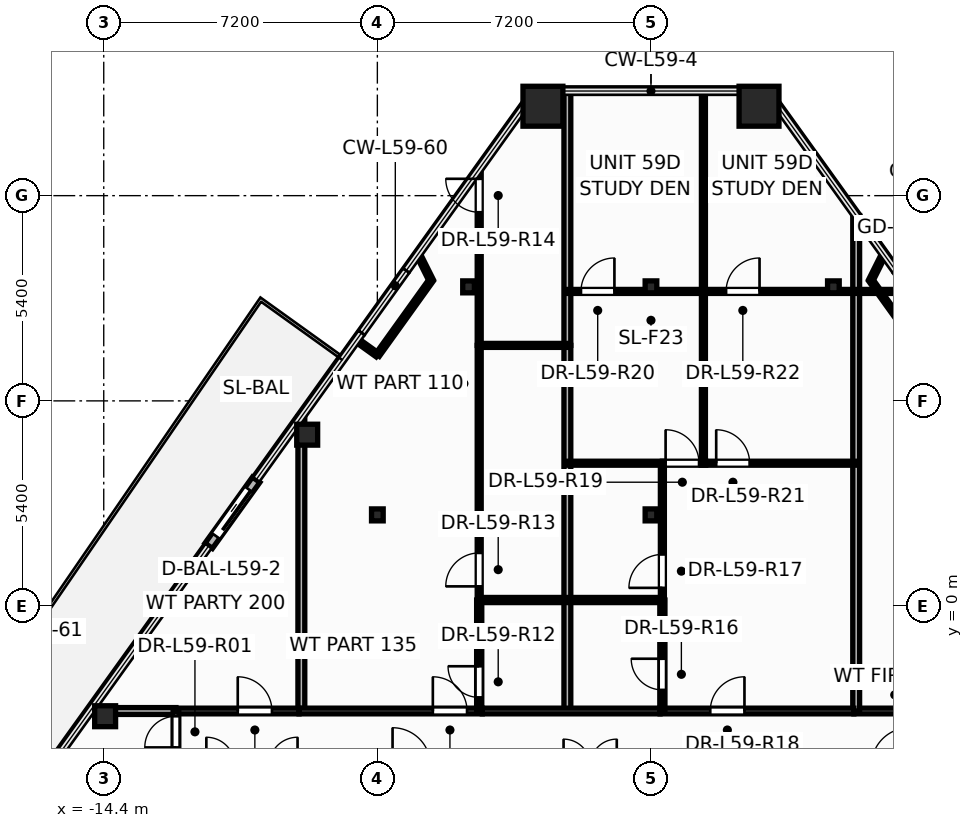
"""IFC4 building model, lengths in metres.
Left out: names, types, materials, properties, quantities, classifications, styles, units other than length and angle.
Written with IfcOpenShell. Run it as: python <this file> out.ifc"""

import sys

from ifc_helpers import new_model, si_unit, direction, frame, frame_2d, origin, origin_2d, place, context, subcontext, project, spatial, rectangle, hollow_rectangle, hollow_circle, i_section, extrude, element, fill, save


model = new_model("IFC4")
c1 = context("Model", 3, precision=1e-05, world=origin(), true_north=direction((0.0, 1.0)))
c2 = subcontext(c1, "Body", "Model", "MODEL_VIEW")
j1 = project(units=[si_unit("LENGTHUNIT", "METRE"), si_unit("PLANEANGLEUNIT", "RADIAN")], contexts=[c1])
p1 = place(None, origin())
s1 = spatial("IfcSite", under=j1, at=p1, CompositionType="ELEMENT")
p2 = place(p1, origin())
s2 = spatial("IfcBuilding", under=s1, at=p2, CompositionType="ELEMENT")
p3 = place(p2, frame((0.0, 0.0, 225.3)))
s3 = spatial("IfcBuildingStorey", under=s2, at=p3, CompositionType="ELEMENT", Elevation=225.3)
for number, where, z_axis, x_axis in (
    (1, (2.843, 13.153, 0.0), (0.0, 0.0, 1.0), (1.0, 0.0, 0.0)),
    (2, (-2.843, 13.153, 0.0), (0.0, 0.0, 1.0), (1.0, 0.0, 0.0)),
):
    element("IfcColumn", number, at=place(p3, frame(where, z_axis=z_axis, x_axis=x_axis)), inside=s3, PredefinedType="COLUMN", context=c2, shape_type="SweptSolid", body=[
        extrude(hollow_rectangle(XDim=1.05, YDim=1.05, WallThickness=0.045, at=origin_2d()), origin(), (0.0, 0.0, 1.0), 3.6),
    ])
for number, where, z_axis, x_axis in (
    (3, (-9.046, 4.51, 0.0), (0.0, 0.0, 1.0), (1.0, 0.0, 0.0)),
    (4, (-14.363, -2.897, 0.0), (0.0, 0.0, 1.0), (1.0, 0.0, 0.0)),
):
    element("IfcColumn", number, at=place(p3, frame(where, z_axis=z_axis, x_axis=x_axis)), inside=s3, PredefinedType="COLUMN", context=c2, shape_type="SweptSolid", body=[
        extrude(hollow_circle(Radius=0.275, WallThickness=0.024, at=origin_2d()), origin(), (0.0, 0.0, 1.0), 3.6),
    ])
for number, where, z_axis, x_axis in (
    (5, (-7.2, 2.4, 0.0), (0.0, 0.0, 1.0), (1.0, 0.0, 0.0)),
    (6, (0.0, 2.4, 0.0), (0.0, 0.0, 1.0), (1.0, 0.0, 0.0)),
    (7, (-4.8, 8.4, 0.0), (0.0, 0.0, 1.0), (1.0, 0.0, 0.0)),
    (8, (0.0, 8.4, 0.0), (0.0, 0.0, 1.0), (1.0, 0.0, 0.0)),
    (9, (4.8, 8.4, 0.0), (0.0, 0.0, 1.0), (1.0, 0.0, 0.0)),
):
    element("IfcColumn", number, at=place(p3, frame(where, z_axis=z_axis, x_axis=x_axis)), inside=s3, PredefinedType="COLUMN", context=c2, shape_type="SweptSolid", body=[
        extrude(i_section(OverallWidth=0.307, OverallDepth=0.314, WebThickness=0.012, FlangeThickness=0.019, at=origin_2d()), origin(), (0.0, 0.0, 1.0), 3.6),
    ])
p4 = place(p3, frame((-10.39, 3.325, -0.015), z_axis=(0.0, 0.0, 1.0), x_axis=(-0.583092889468, -0.812405491274, 0.0)))
e10 = element("IfcWall", 10, at=p4, inside=s3, PredefinedType="STANDARD", context=c2, shape_type="SweptSolid", body=[
    extrude(rectangle(XDim=2.14, YDim=0.24, at=frame_2d((1.07, 0.0))), origin(), (0.0, 0.0, 1.0), 2.853),
])
p5 = place(p4, frame((0.32, 0.0, 0.015)))
e11 = element("IfcOpeningElement", 11, at=p5, cuts=e10, PredefinedType="OPENING", context=c2, shape_type="SweptSolid", body=[
    extrude(rectangle(XDim=1.506, YDim=2.204, at=frame_2d((0.75, 1.102))), frame((0.0, 0.13, 0.0), z_axis=(0.0, -1.0, 0.0), x_axis=(1.0, 0.0, 0.0)), (0.0, 0.0, 1.0), 0.26),
])
p6 = place(p3, frame((-9.2, -2.76, 0.0), z_axis=(0.0, 0.0, 1.0), x_axis=(0.0, 1.0, 0.0)))
e12 = element("IfcWall", 12, at=p6, inside=s3, PredefinedType="PARTITIONING", context=c2, shape_type="SweptSolid", body=[
    extrude(rectangle(XDim=7.742, YDim=0.18, at=frame_2d((3.871, 0.0))), origin(), (0.0, 0.0, 1.0), 2.595),
])
p7 = place(p3, frame((5.34, -2.76, 0.0), z_axis=(0.0, 0.0, 1.0), x_axis=(1.0, 0.0, 0.0)))
e13 = element("IfcWall", 13, at=p7, inside=s3, PredefinedType="PARTITIONING", context=c2, shape_type="SweptSolid", body=[
    extrude(rectangle(XDim=7.16, YDim=0.15, at=frame_2d((3.58, 0.0))), origin(), (0.0, 0.0, 1.0), 2.295),
])
p8 = place(p7, frame((3.429, 0.0, 0.0)))
e14 = element("IfcOpeningElement", 14, at=p8, cuts=e13, PredefinedType="OPENING", context=c2, shape_type="SweptSolid", body=[
    extrude(rectangle(XDim=0.906, YDim=2.104, at=frame_2d((0.45, 1.052))), frame((0.0, 0.085, 0.0), z_axis=(0.0, -1.0, 0.0), x_axis=(1.0, 0.0, 0.0)), (0.0, 0.0, 1.0), 0.17),
])
p9 = place(p3, frame((-4.52, 0.16, 0.0), z_axis=(0.0, 0.0, 1.0), x_axis=(0.0, 1.0, 0.0)))
e15 = element("IfcWall", 15, at=p9, inside=s3, PredefinedType="PARTITIONING", context=c2, shape_type="SweptSolid", body=[
    extrude(rectangle(XDim=6.7, YDim=0.105, at=frame_2d((3.35, 0.0))), origin(), (0.0, 0.0, 1.0), 2.295),
])
p10 = place(p9, frame((0.359, 0.0, 0.0)))
e16 = element("IfcOpeningElement", 16, at=p10, cuts=e15, PredefinedType="OPENING", context=c2, shape_type="SweptSolid", body=[
    extrude(rectangle(XDim=0.886, YDim=2.104, at=frame_2d((0.44, 1.052))), frame((0.0, 0.062, 0.0), z_axis=(0.0, -1.0, 0.0), x_axis=(1.0, 0.0, 0.0)), (0.0, 0.0, 1.0), 0.125),
])
p11 = place(p3, frame((5.4, -2.76, 0.0), z_axis=(0.0, 0.0, 1.0), x_axis=(0.0, 1.0, 0.0)))
e17 = element("IfcWall", 17, at=p11, inside=s3, PredefinedType="PARTITIONING", context=c2, shape_type="SweptSolid", body=[
    extrude(rectangle(XDim=13.037, YDim=0.18, at=frame_2d((6.518, 0.0))), origin(), (0.0, 0.0, 1.0), 2.295),
])
p12 = place(p3, frame((1.38, 8.28, 0.0), z_axis=(0.0, 0.0, 1.0), x_axis=(1.0, 0.0, 0.0)))
e18 = element("IfcWall", 18, at=p12, inside=s3, PredefinedType="PARTITIONING", context=c2, shape_type="SweptSolid", body=[
    extrude(rectangle(XDim=5.453, YDim=0.105, at=frame_2d((2.727, 0.0))), origin(), (0.0, 0.0, 1.0), 2.595),
])
p13 = place(p12, frame((0.597, 0.0, 0.0)))
e19 = element("IfcOpeningElement", 19, at=p13, cuts=e18, PredefinedType="OPENING", context=c2, shape_type="SweptSolid", body=[
    extrude(rectangle(XDim=0.886, YDim=2.104, at=frame_2d((0.44, 1.052))), frame((0.0, 0.062, 0.0), z_axis=(0.0, -1.0, 0.0), x_axis=(1.0, 0.0, 0.0)), (0.0, 0.0, 1.0), 0.125),
])
p14 = place(p3, frame((-2.2, 6.86, 0.0), z_axis=(0.0, 0.0, 1.0), x_axis=(0.0, 1.0, 0.0)))
e20 = element("IfcWall", 20, at=p14, inside=s3, PredefinedType="PARTITIONING", context=c2, shape_type="SweptSolid", body=[
    extrude(rectangle(XDim=6.693, YDim=0.18, at=frame_2d((3.346, 0.0))), origin(), (0.0, 0.0, 1.0), 2.595),
])
p15 = place(p3, frame((1.38, 3.76, 0.0), z_axis=(0.0, 0.0, 1.0), x_axis=(0.0, 1.0, 0.0)))
e21 = element("IfcWall", 21, at=p15, inside=s3, PredefinedType="PARTITIONING", context=c2, shape_type="SweptSolid", body=[
    extrude(rectangle(XDim=9.793, YDim=0.105, at=frame_2d((4.896, 0.0))), origin(), (0.0, 0.0, 1.0), 2.595),
])
p16 = place(p3, frame((0.24, -2.76, 0.0), z_axis=(0.0, 0.0, 1.0), x_axis=(1.0, 0.0, 0.0)))
e22 = element("IfcWall", 22, at=p16, inside=s3, PredefinedType="PARTITIONING", context=c2, shape_type="SweptSolid", body=[
    extrude(rectangle(XDim=5.098, YDim=0.15, at=frame_2d((2.549, 0.0))), origin(), (0.0, 0.0, 1.0), 2.939),
])
p17 = place(p16, frame((1.32, 0.0, 0.0)))
e23 = element("IfcOpeningElement", 23, at=p17, cuts=e22, PredefinedType="OPENING", context=c2, shape_type="SweptSolid", body=[
    extrude(rectangle(XDim=0.906, YDim=2.104, at=frame_2d((0.45, 1.052))), frame((0.0, 0.085, 0.0), z_axis=(0.0, -1.0, 0.0), x_axis=(1.0, 0.0, 0.0)), (0.0, 0.0, 1.0), 0.17),
])
p18 = place(p3, frame((-9.26, -2.76, 0.0), z_axis=(0.0, 0.0, 1.0), x_axis=(1.0, 0.0, 0.0)))
e24 = element("IfcWall", 24, at=p18, inside=s3, PredefinedType="PARTITIONING", context=c2, shape_type="SweptSolid", body=[
    extrude(rectangle(XDim=4.82, YDim=0.15, at=frame_2d((2.41, 0.0))), origin(), (0.0, 0.0, 1.0), 2.295),
])
p19 = place(p18, frame((3.52, 0.0, 0.0)))
e25 = element("IfcOpeningElement", 25, at=p19, cuts=e24, PredefinedType="OPENING", context=c2, shape_type="SweptSolid", body=[
    extrude(rectangle(XDim=0.906, YDim=2.104, at=frame_2d((0.45, 1.052))), frame((0.0, 0.085, 0.0), z_axis=(0.0, -1.0, 0.0), x_axis=(1.0, 0.0, 0.0)), (0.0, 0.0, 1.0), 0.17),
])
p20 = place(p3, frame((-4.52, 6.86, 0.0), z_axis=(0.0, 0.0, 1.0), x_axis=(0.0, 1.0, 0.0)))
e26 = element("IfcWall", 26, at=p20, inside=s3, PredefinedType="PARTITIONING", context=c2, shape_type="SweptSolid", body=[
    extrude(rectangle(XDim=4.643, YDim=0.105, at=frame_2d((2.321, 0.0))), origin(), (0.0, 0.0, 1.0), 2.595),
])
p21 = place(p20, frame((3.503, 0.0, 0.0)))
e27 = element("IfcOpeningElement", 27, at=p21, cuts=e26, PredefinedType="OPENING", context=c2, shape_type="SweptSolid", body=[
    extrude(rectangle(XDim=0.886, YDim=2.104, at=frame_2d((0.44, 1.052))), frame((0.0, 0.062, 0.0), z_axis=(0.0, -1.0, 0.0), x_axis=(1.0, 0.0, 0.0)), (0.0, 0.0, 1.0), 0.125),
])
p22 = place(p3, frame((1.32, 3.76, 0.0), z_axis=(0.0, 0.0, 1.0), x_axis=(1.0, 0.0, 0.0)))
e28 = element("IfcWall", 28, at=p22, inside=s3, PredefinedType="PARTITIONING", context=c2, shape_type="SweptSolid", body=[
    extrude(rectangle(XDim=4.08, YDim=0.105, at=frame_2d((2.04, 0.0))), origin(), (0.0, 0.0, 1.0), 2.939),
])
p23 = place(p22, frame((0.396, 0.0, 0.0)))
e29 = element("IfcOpeningElement", 29, at=p23, cuts=e28, PredefinedType="OPENING", context=c2, shape_type="SweptSolid", body=[
    extrude(rectangle(XDim=0.886, YDim=2.104, at=frame_2d((0.44, 1.052))), frame((0.0, 0.062, 0.0), z_axis=(0.0, -1.0, 0.0), x_axis=(1.0, 0.0, 0.0)), (0.0, 0.0, 1.0), 0.125),
])
p24 = place(p3, frame((-2.2, -2.76, 0.0), z_axis=(0.0, 0.0, 1.0), x_axis=(0.0, 1.0, 0.0)))
e30 = element("IfcWall", 30, at=p24, inside=s3, PredefinedType="PARTITIONING", context=c2, shape_type="SweptSolid", body=[
    extrude(rectangle(XDim=9.62, YDim=0.18, at=frame_2d((4.81, 0.0))), origin(), (0.0, 0.0, 1.0), 2.295),
])
p25 = place(p3, frame((0.3, 0.16, 0.0), z_axis=(0.0, 0.0, 1.0), x_axis=(0.0, 1.0, 0.0)))
e31 = element("IfcWall", 31, at=p25, inside=s3, PredefinedType="PARTITIONING", context=c2, shape_type="SweptSolid", body=[
    extrude(rectangle(XDim=3.6, YDim=0.105, at=frame_2d((1.8, 0.0))), origin(), (0.0, 0.0, 1.0), 2.295),
])
p26 = place(p25, frame((0.32, 0.0, 0.0)))
e32 = element("IfcOpeningElement", 32, at=p26, cuts=e31, PredefinedType="OPENING", context=c2, shape_type="SweptSolid", body=[
    extrude(rectangle(XDim=0.886, YDim=2.104, at=frame_2d((0.44, 1.052))), frame((0.0, 0.062, 0.0), z_axis=(0.0, -1.0, 0.0), x_axis=(1.0, 0.0, 0.0)), (0.0, 0.0, 1.0), 0.125),
])
p27 = place(p3, frame((-2.2, 8.28, 0.0), z_axis=(0.0, 0.0, 1.0), x_axis=(1.0, 0.0, 0.0)))
e33 = element("IfcWall", 33, at=p27, inside=s3, PredefinedType="PARTITIONING", context=c2, shape_type="SweptSolid", body=[
    extrude(rectangle(XDim=3.58, YDim=0.105, at=frame_2d((1.79, 0.0))), origin(), (0.0, 0.0, 1.0), 2.295),
])
p28 = place(p27, frame((0.358, 0.0, 0.0)))
e34 = element("IfcOpeningElement", 34, at=p28, cuts=e33, PredefinedType="OPENING", context=c2, shape_type="SweptSolid", body=[
    extrude(rectangle(XDim=0.886, YDim=2.104, at=frame_2d((0.44, 1.052))), frame((0.0, 0.062, 0.0), z_axis=(0.0, -1.0, 0.0), x_axis=(1.0, 0.0, 0.0)), (0.0, 0.0, 1.0), 0.125),
])
p29 = place(p3, frame((-12.5, -2.76, 0.0), z_axis=(0.0, 0.0, 1.0), x_axis=(1.0, 0.0, 0.0)))
e35 = element("IfcWall", 35, at=p29, inside=s3, PredefinedType="PARTITIONING", context=c2, shape_type="SweptSolid", body=[
    extrude(rectangle(XDim=3.238, YDim=0.15, at=frame_2d((1.619, 0.0))), origin(), (0.0, 0.0, 1.0), 3.32),
])
p30 = place(p29, frame((1.626, 0.0, 0.0)))
e36 = element("IfcOpeningElement", 36, at=p30, cuts=e35, PredefinedType="OPENING", context=c2, shape_type="SweptSolid", body=[
    extrude(rectangle(XDim=0.906, YDim=2.104, at=frame_2d((0.45, 1.052))), frame((0.0, 0.085, 0.0), z_axis=(0.0, -1.0, 0.0), x_axis=(1.0, 0.0, 0.0)), (0.0, 0.0, 1.0), 0.17),
])
p31 = place(p3, frame((-4.52, -2.76, 0.0), z_axis=(0.0, 0.0, 1.0), x_axis=(0.0, 1.0, 0.0)))
e37 = element("IfcWall", 37, at=p31, inside=s3, PredefinedType="PARTITIONING", context=c2, shape_type="SweptSolid", body=[
    extrude(rectangle(XDim=2.92, YDim=0.135, at=frame_2d((1.46, 0.0))), origin(), (0.0, 0.0, 1.0), 3.32),
])
p32 = place(p31, frame((0.357, 0.0, 0.0)))
e38 = element("IfcOpeningElement", 38, at=p32, cuts=e37, PredefinedType="OPENING", context=c2, shape_type="SweptSolid", body=[
    extrude(rectangle(XDim=0.826, YDim=2.104, at=frame_2d((0.41, 1.052))), frame((0.0, 0.078, 0.0), z_axis=(0.0, -1.0, 0.0), x_axis=(1.0, 0.0, 0.0)), (0.0, 0.0, 1.0), 0.155),
])
p33 = place(p3, frame((0.3, -2.76, 0.0), z_axis=(0.0, 0.0, 1.0), x_axis=(0.0, 1.0, 0.0)))
e39 = element("IfcWall", 39, at=p33, inside=s3, PredefinedType="PARTITIONING", context=c2, shape_type="SweptSolid", body=[
    extrude(rectangle(XDim=2.92, YDim=0.135, at=frame_2d((1.46, 0.0))), origin(), (0.0, 0.0, 1.0), 2.295),
])
p34 = place(p33, frame((0.555, 0.0, 0.0)))
e40 = element("IfcOpeningElement", 40, at=p34, cuts=e39, PredefinedType="OPENING", context=c2, shape_type="SweptSolid", body=[
    extrude(rectangle(XDim=0.826, YDim=2.104, at=frame_2d((0.41, 1.052))), frame((0.0, 0.078, 0.0), z_axis=(0.0, -1.0, 0.0), x_axis=(1.0, 0.0, 0.0)), (0.0, 0.0, 1.0), 0.155),
])
p35 = place(p3, frame((-4.438, -2.76, 0.0), z_axis=(0.0, 0.0, 1.0), x_axis=(1.0, 0.0, 0.0)))
e41 = element("IfcWall", 41, at=p35, inside=s3, PredefinedType="PARTITIONING", context=c2, shape_type="SweptSolid", body=[
    extrude(rectangle(XDim=4.676, YDim=0.15, at=frame_2d((2.338, 0.0))), origin(), (0.0, 0.0, 1.0), 2.295),
])
p36 = place(p3, frame((-4.52, 0.16, 0.0), z_axis=(0.0, 0.0, 1.0), x_axis=(1.0, 0.0, 0.0)))
e42 = element("IfcWall", 42, at=p36, inside=s3, PredefinedType="PARTITIONING", context=c2, shape_type="SweptSolid", body=[
    extrude(rectangle(XDim=4.82, YDim=0.135, at=frame_2d((2.41, 0.0))), origin(), (0.0, 0.0, 1.0), 2.295),
])
p37 = place(p3, frame((-2.2, 3.76, 0.0), z_axis=(0.0, 0.0, 1.0), x_axis=(1.0, 0.0, 0.0)))
e43 = element("IfcWall", 43, at=p37, inside=s3, PredefinedType="PARTITIONING", context=c2, shape_type="SweptSolid", body=[
    extrude(rectangle(XDim=2.5, YDim=0.105, at=frame_2d((1.25, 0.0))), origin(), (0.0, 0.0, 1.0), 2.295),
])
for number, where, z_axis, x_axis in (
    (44, (-5.785, 8.574, 0.0), (0.0, 0.0, 1.0), (-0.583, -0.812, 0.0)),
    (45, (7.197, 6.607, 0.0), (0.0, 0.0, 1.0), (-0.583, 0.812, 0.0)),
):
    element("IfcWall", number, at=place(p3, frame(where, z_axis=z_axis, x_axis=x_axis)), inside=s3, PredefinedType="PARTITIONING", context=c2, shape_type="SweptSolid", body=[
        extrude(rectangle(XDim=2.421, YDim=0.12, at=frame_2d((1.21, 0.0))), origin(), (0.0, 0.0, 1.0), 3.32),
    ])
p38 = place(p3, frame((-4.52, 6.86, 0.0), z_axis=(0.0, 0.0, 1.0), x_axis=(1.0, 0.0, 0.0)))
e46 = element("IfcWall", 46, at=p38, inside=s3, PredefinedType="PARTITIONING", context=c2, shape_type="SweptSolid", body=[
    extrude(rectangle(XDim=2.32, YDim=0.105, at=frame_2d((1.16, 0.0))), origin(), (0.0, 0.0, 1.0), 2.939),
])
p39 = place(p3, frame((-14.757, -2.76, 0.0), z_axis=(0.0, 0.0, 1.0), x_axis=(1.0, 0.0, 0.0)))
e47 = element("IfcWall", 47, at=p39, inside=s3, PredefinedType="PARTITIONING", context=c2, shape_type="SweptSolid", body=[
    extrude(rectangle(XDim=2.257, YDim=0.18, at=frame_2d((1.129, 0.0))), origin(), (0.0, 0.0, 1.0), 2.595),
])
p40 = place(p3, frame((-12.5, -4.24, 0.0), z_axis=(0.0, 0.0, 1.0), x_axis=(0.0, 1.0, 0.0)))
e48 = element("IfcWall", 48, at=p40, inside=s3, PredefinedType="PARTITIONING", context=c2, shape_type="SweptSolid", body=[
    extrude(rectangle(XDim=1.48, YDim=0.15, at=frame_2d((0.74, 0.0))), origin(), (0.0, 0.0, 1.0), 2.295),
])
p41 = place(p40, frame((0.522, 0.0, 0.0)))
e49 = element("IfcOpeningElement", 49, at=p41, cuts=e48, PredefinedType="OPENING", context=c2, shape_type="SweptSolid", body=[
    extrude(rectangle(XDim=0.826, YDim=2.104, at=frame_2d((0.41, 1.052))), frame((0.0, 0.085, 0.0), z_axis=(0.0, -1.0, 0.0), x_axis=(1.0, 0.0, 0.0)), (0.0, 0.0, 1.0), 0.17),
])
p42 = place(p3, frame((0.3, 3.76, 0.0), z_axis=(0.0, 0.0, 1.0), x_axis=(1.0, 0.0, 0.0)))
e50 = element("IfcWall", 50, at=p42, inside=s3, PredefinedType="PARTITIONING", context=c2, shape_type="SweptSolid", body=[
    extrude(rectangle(XDim=1.14, YDim=0.105, at=frame_2d((0.57, 0.0))), origin(), (0.0, 0.0, 1.0), 3.32),
])
p43 = place(p42, frame((0.085, 0.0, 0.0)))
e51 = element("IfcOpeningElement", 51, at=p43, cuts=e50, PredefinedType="OPENING", context=c2, shape_type="SweptSolid", body=[
    extrude(rectangle(XDim=0.886, YDim=2.104, at=frame_2d((0.44, 1.052))), frame((0.0, 0.062, 0.0), z_axis=(0.0, -1.0, 0.0), x_axis=(1.0, 0.0, 0.0)), (0.0, 0.0, 1.0), 0.125),
])
for number, where, z_axis, x_axis in (
    (52, (-6.124, 9.251, 0.0), (0.0, 0.0, 1.0), (0.447, -0.894, 0.0)),
    (53, (5.785, 8.574, 0.0), (0.0, 0.0, 1.0), (0.447, 0.894, 0.0)),
):
    element("IfcWall", number, at=place(p3, frame(where, z_axis=z_axis, x_axis=x_axis)), inside=s3, PredefinedType="PARTITIONING", context=c2, shape_type="SweptSolid", body=[
        extrude(rectangle(XDim=0.757, YDim=0.12, at=frame_2d((0.378, 0.0))), origin(), (0.0, 0.0, 1.0), 2.838),
    ])
p44 = place(p3, frame((-7.197, 6.607, 0.0), z_axis=(0.0, 0.0, 1.0), x_axis=(-0.812549510699, 0.582892179277, 0.0)))
e54 = element("IfcWall", 54, at=p44, inside=s3, PredefinedType="PARTITIONING", context=c2, shape_type="SweptSolid", body=[
    extrude(rectangle(XDim=0.67, YDim=0.12, at=frame_2d((0.335, 0.0))), origin(), (0.0, 0.0, 1.0), 2.838),
])
p45 = place(p5, origin())
e55 = element("IfcDoor", 55, at=p45, inside=s3, OperationType="SLIDING_TO_RIGHT", PredefinedType="DOOR", context=c2, shape_type="SweptSolid", body=[
    extrude(rectangle(XDim=1.5, YDim=2.2, at=frame_2d((0.75, 1.1))), frame((0.0, 0.025, 0.0), z_axis=(0.0, -1.0, 0.0), x_axis=(1.0, 0.0, 0.0)), (0.0, 0.0, 1.0), 0.05),
])
fill(e11, e55)
p46 = place(p41, origin())
e56 = element("IfcDoor", 56, at=p46, inside=s3, OperationType="SINGLE_SWING_LEFT", PredefinedType="DOOR", context=c2, shape_type="SweptSolid", body=[
    extrude(rectangle(XDim=0.82, YDim=2.1, at=frame_2d((0.41, 1.05))), frame((0.0, 0.025, 0.0), z_axis=(0.0, -1.0, 0.0), x_axis=(1.0, 0.0, 0.0)), (0.0, 0.0, 1.0), 0.05),
])
fill(e49, e56)
p47 = place(p30, origin())
e57 = element("IfcDoor", 57, at=p47, inside=s3, OperationType="SINGLE_SWING_LEFT", PredefinedType="DOOR", context=c2, shape_type="SweptSolid", body=[
    extrude(rectangle(XDim=0.9, YDim=2.1, at=frame_2d((0.45, 1.05))), frame((0.0, 0.025, 0.0), z_axis=(0.0, -1.0, 0.0), x_axis=(1.0, 0.0, 0.0)), (0.0, 0.0, 1.0), 0.05),
])
fill(e36, e57)
p48 = place(p32, origin())
e58 = element("IfcDoor", 58, at=p48, inside=s3, OperationType="SINGLE_SWING_RIGHT", PredefinedType="DOOR", context=c2, shape_type="SweptSolid", body=[
    extrude(rectangle(XDim=0.82, YDim=2.1, at=frame_2d((0.41, 1.05))), frame((0.0, 0.025, 0.0), z_axis=(0.0, -1.0, 0.0), x_axis=(1.0, 0.0, 0.0)), (0.0, 0.0, 1.0), 0.05),
])
fill(e38, e58)
p49 = place(p10, origin())
e59 = element("IfcDoor", 59, at=p49, inside=s3, OperationType="SINGLE_SWING_LEFT", PredefinedType="DOOR", context=c2, shape_type="SweptSolid", body=[
    extrude(rectangle(XDim=0.88, YDim=2.1, at=frame_2d((0.44, 1.05))), frame((0.0, 0.025, 0.0), z_axis=(0.0, -1.0, 0.0), x_axis=(1.0, 0.0, 0.0)), (0.0, 0.0, 1.0), 0.05),
])
fill(e16, e59)
p50 = place(p21, origin())
e60 = element("IfcDoor", 60, at=p50, inside=s3, OperationType="SINGLE_SWING_RIGHT", PredefinedType="DOOR", context=c2, shape_type="SweptSolid", body=[
    extrude(rectangle(XDim=0.88, YDim=2.1, at=frame_2d((0.44, 1.05))), frame((0.0, 0.025, 0.0), z_axis=(0.0, -1.0, 0.0), x_axis=(1.0, 0.0, 0.0)), (0.0, 0.0, 1.0), 0.05),
])
fill(e27, e60)
p51 = place(p19, origin())
e61 = element("IfcDoor", 61, at=p51, inside=s3, OperationType="SINGLE_SWING_LEFT", PredefinedType="DOOR", context=c2, shape_type="SweptSolid", body=[
    extrude(rectangle(XDim=0.9, YDim=2.1, at=frame_2d((0.45, 1.05))), frame((0.0, 0.025, 0.0), z_axis=(0.0, -1.0, 0.0), x_axis=(1.0, 0.0, 0.0)), (0.0, 0.0, 1.0), 0.05),
])
fill(e25, e61)
p52 = place(p34, origin())
e62 = element("IfcDoor", 62, at=p52, inside=s3, OperationType="SINGLE_SWING_RIGHT", PredefinedType="DOOR", context=c2, shape_type="SweptSolid", body=[
    extrude(rectangle(XDim=0.82, YDim=2.1, at=frame_2d((0.41, 1.05))), frame((0.0, 0.025, 0.0), z_axis=(0.0, -1.0, 0.0), x_axis=(1.0, 0.0, 0.0)), (0.0, 0.0, 1.0), 0.05),
])
fill(e40, e62)
p53 = place(p26, origin())
e63 = element("IfcDoor", 63, at=p53, inside=s3, OperationType="SINGLE_SWING_LEFT", PredefinedType="DOOR", context=c2, shape_type="SweptSolid", body=[
    extrude(rectangle(XDim=0.88, YDim=2.1, at=frame_2d((0.44, 1.05))), frame((0.0, 0.025, 0.0), z_axis=(0.0, -1.0, 0.0), x_axis=(1.0, 0.0, 0.0)), (0.0, 0.0, 1.0), 0.05),
])
fill(e32, e63)
p54 = place(p17, origin())
e64 = element("IfcDoor", 64, at=p54, inside=s3, OperationType="SINGLE_SWING_RIGHT", PredefinedType="DOOR", context=c2, shape_type="SweptSolid", body=[
    extrude(rectangle(XDim=0.9, YDim=2.1, at=frame_2d((0.45, 1.05))), frame((0.0, 0.025, 0.0), z_axis=(0.0, -1.0, 0.0), x_axis=(1.0, 0.0, 0.0)), (0.0, 0.0, 1.0), 0.05),
])
fill(e23, e64)
p55 = place(p43, origin())
e65 = element("IfcDoor", 65, at=p55, inside=s3, OperationType="SINGLE_SWING_LEFT", PredefinedType="DOOR", context=c2, shape_type="SweptSolid", body=[
    extrude(rectangle(XDim=0.88, YDim=2.1, at=frame_2d((0.44, 1.05))), frame((0.0, 0.025, 0.0), z_axis=(0.0, -1.0, 0.0), x_axis=(1.0, 0.0, 0.0)), (0.0, 0.0, 1.0), 0.05),
])
fill(e51, e65)
p56 = place(p28, origin())
e66 = element("IfcDoor", 66, at=p56, inside=s3, OperationType="SINGLE_SWING_RIGHT", PredefinedType="DOOR", context=c2, shape_type="SweptSolid", body=[
    extrude(rectangle(XDim=0.88, YDim=2.1, at=frame_2d((0.44, 1.05))), frame((0.0, 0.025, 0.0), z_axis=(0.0, -1.0, 0.0), x_axis=(1.0, 0.0, 0.0)), (0.0, 0.0, 1.0), 0.05),
])
fill(e34, e66)
p57 = place(p23, origin())
e67 = element("IfcDoor", 67, at=p57, inside=s3, OperationType="SINGLE_SWING_LEFT", PredefinedType="DOOR", context=c2, shape_type="SweptSolid", body=[
    extrude(rectangle(XDim=0.88, YDim=2.1, at=frame_2d((0.44, 1.05))), frame((0.0, 0.025, 0.0), z_axis=(0.0, -1.0, 0.0), x_axis=(1.0, 0.0, 0.0)), (0.0, 0.0, 1.0), 0.05),
])
fill(e29, e67)
p58 = place(p13, origin())
e68 = element("IfcDoor", 68, at=p58, inside=s3, OperationType="SINGLE_SWING_RIGHT", PredefinedType="DOOR", context=c2, shape_type="SweptSolid", body=[
    extrude(rectangle(XDim=0.88, YDim=2.1, at=frame_2d((0.44, 1.05))), frame((0.0, 0.025, 0.0), z_axis=(0.0, -1.0, 0.0), x_axis=(1.0, 0.0, 0.0)), (0.0, 0.0, 1.0), 0.05),
])
fill(e19, e68)
save(model, sys.argv[1])
